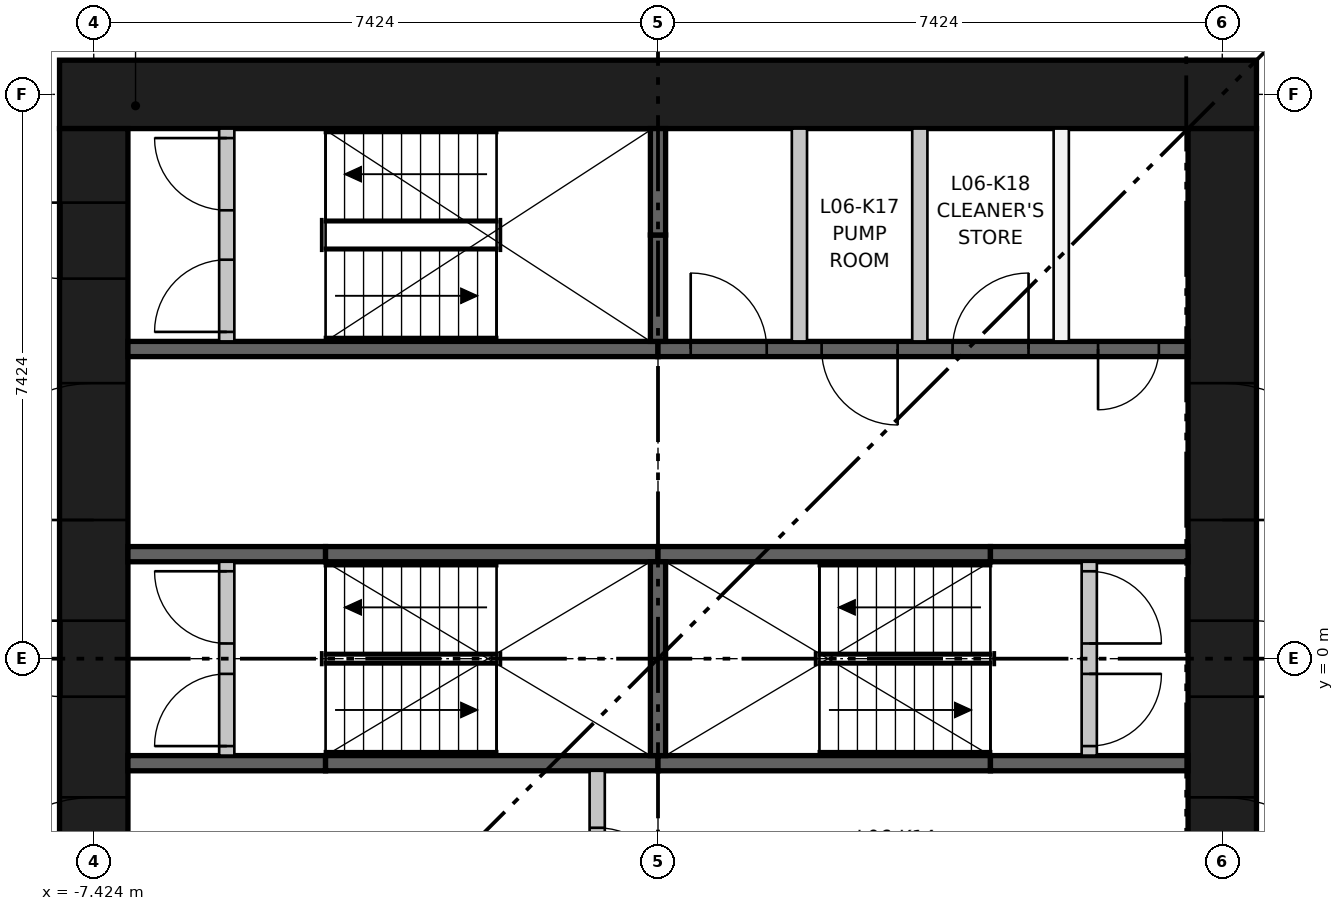
"""IFC4 building model, lengths in metres.
Left out: names, types, materials, properties, quantities, classifications, styles, units other than length and angle.
Written with IfcOpenShell. Run it as: python <this file> out.ifc"""

import sys

from ifc_helpers import new_model, si_unit, direction, frame, frame_2d, origin, place, context, subcontext, project, spatial, rectangle, extrude, element, fill, save


model = new_model("IFC4")
c1 = context("Model", 3, precision=1e-05, world=origin(), true_north=direction((0.0, 1.0)))
c2 = subcontext(c1, "Body", "Model", "MODEL_VIEW")
j1 = project(units=[si_unit("LENGTHUNIT", "METRE"), si_unit("PLANEANGLEUNIT", "RADIAN")], contexts=[c1])
p1 = place(None, origin())
s1 = spatial("IfcSite", under=j1, at=p1, CompositionType="ELEMENT")
p2 = place(p1, origin())
s2 = spatial("IfcBuilding", under=s1, at=p2, CompositionType="ELEMENT")
p3 = place(p2, frame((0.0, 0.0, 26.2)))
s3 = spatial("IfcBuildingStorey", under=s2, at=p3, CompositionType="ELEMENT", Elevation=26.2)
p4 = place(p3, frame((-7.874, 7.424, 0.0), z_axis=(0.0, 0.0, 1.0), x_axis=(1.0, 0.0, 0.0)))
e1 = element("IfcWall", 1, at=p4, inside=s3, PredefinedType="SHEAR", context=c2, shape_type="SweptSolid", body=[
    extrude(rectangle(XDim=15.748, YDim=0.9, at=frame_2d((7.874, 0.0))), origin(), (0.0, 0.0, 1.0), 3.65),
])
p5 = place(p3, frame((-7.424, -6.974, 0.0), z_axis=(0.0, 0.0, 1.0), x_axis=(0.0, 1.0, 0.0)))
e2 = element("IfcWall", 2, at=p5, inside=s3, PredefinedType="SHEAR", context=c2, shape_type="SweptSolid", body=[
    extrude(rectangle(XDim=13.948, YDim=0.9, at=frame_2d((6.974, 0.0))), origin(), (0.0, 0.0, 1.0), 3.65),
])
p6 = place(p5, frame((6.474, 0.0, 0.0)))
e3 = element("IfcOpeningElement", 3, at=p6, cuts=e2, PredefinedType="OPENING", context=c2, shape_type="SweptSolid", body=[
    extrude(rectangle(XDim=1.0, YDim=2.1, at=frame_2d((0.5, 1.05))), frame((0.0, 0.46, 0.0), z_axis=(0.0, -1.0, 0.0), x_axis=(1.0, 0.0, 0.0)), (0.0, 0.0, 1.0), 0.92),
])
p7 = place(p5, frame((3.35, 0.0, 0.0)))
e4 = element("IfcOpeningElement", 4, at=p7, cuts=e2, PredefinedType="OPENING", context=c2, shape_type="SweptSolid", body=[
    extrude(rectangle(XDim=1.8, YDim=2.1, at=frame_2d((0.9, 1.05))), frame((0.0, 0.46, 0.0), z_axis=(0.0, -1.0, 0.0), x_axis=(1.0, 0.0, 0.0)), (0.0, 0.0, 1.0), 0.92),
])
p8 = place(p5, frame((8.799, 0.0, 0.0)))
e5 = element("IfcOpeningElement", 5, at=p8, cuts=e2, PredefinedType="OPENING", context=c2, shape_type="SweptSolid", body=[
    extrude(rectangle(XDim=1.8, YDim=2.1, at=frame_2d((0.9, 1.05))), frame((0.0, 0.46, 0.0), z_axis=(0.0, -1.0, 0.0), x_axis=(1.0, 0.0, 0.0)), (0.0, 0.0, 1.0), 0.92),
])
p9 = place(p5, frame((11.974, 0.0, 0.0)))
e6 = element("IfcOpeningElement", 6, at=p9, cuts=e2, PredefinedType="OPENING", context=c2, shape_type="SweptSolid", body=[
    extrude(rectangle(XDim=1.0, YDim=2.1, at=frame_2d((0.5, 1.05))), frame((0.0, 0.46, 0.0), z_axis=(0.0, -1.0, 0.0), x_axis=(1.0, 0.0, 0.0)), (0.0, 0.0, 1.0), 0.92),
])
p10 = place(p3, frame((7.424, -6.974, 0.0), z_axis=(0.0, 0.0, 1.0), x_axis=(0.0, 1.0, 0.0)))
e7 = element("IfcWall", 7, at=p10, inside=s3, PredefinedType="SHEAR", context=c2, shape_type="SweptSolid", body=[
    extrude(rectangle(XDim=13.948, YDim=0.9, at=frame_2d((6.974, 0.0))), origin(), (0.0, 0.0, 1.0), 3.65),
])
p11 = place(p10, frame((6.474, 0.0, 0.0)))
e8 = element("IfcOpeningElement", 8, at=p11, cuts=e7, PredefinedType="OPENING", context=c2, shape_type="SweptSolid", body=[
    extrude(rectangle(XDim=1.0, YDim=2.1, at=frame_2d((0.5, 1.05))), frame((0.0, 0.46, 0.0), z_axis=(0.0, -1.0, 0.0), x_axis=(1.0, 0.0, 0.0)), (0.0, 0.0, 1.0), 0.92),
])
p12 = place(p10, frame((3.35, 0.0, 0.0)))
e9 = element("IfcOpeningElement", 9, at=p12, cuts=e7, PredefinedType="OPENING", context=c2, shape_type="SweptSolid", body=[
    extrude(rectangle(XDim=1.8, YDim=2.1, at=frame_2d((0.9, 1.05))), frame((0.0, 0.46, 0.0), z_axis=(0.0, -1.0, 0.0), x_axis=(1.0, 0.0, 0.0)), (0.0, 0.0, 1.0), 0.92),
])
p13 = place(p10, frame((8.799, 0.0, 0.0)))
e10 = element("IfcOpeningElement", 10, at=p13, cuts=e7, PredefinedType="OPENING", context=c2, shape_type="SweptSolid", body=[
    extrude(rectangle(XDim=1.8, YDim=2.1, at=frame_2d((0.9, 1.05))), frame((0.0, 0.46, 0.0), z_axis=(0.0, -1.0, 0.0), x_axis=(1.0, 0.0, 0.0)), (0.0, 0.0, 1.0), 0.92),
])
p14 = place(p3, frame((-6.974, 4.074, 0.0), z_axis=(0.0, 0.0, 1.0), x_axis=(1.0, 0.0, 0.0)))
e11 = element("IfcWall", 11, at=p14, inside=s3, PredefinedType="SHEAR", context=c2, shape_type="SweptSolid", body=[
    extrude(rectangle(XDim=6.974, YDim=0.2, at=frame_2d((3.487, 0.0))), origin(), (0.0, 0.0, 1.0), 3.3),
])
p15 = place(p3, frame((0.0, 4.074, 0.0), z_axis=(0.0, 0.0, 1.0), x_axis=(1.0, 0.0, 0.0)))
e12 = element("IfcWall", 12, at=p15, inside=s3, PredefinedType="SHEAR", context=c2, shape_type="SweptSolid", body=[
    extrude(rectangle(XDim=6.974, YDim=0.2, at=frame_2d((3.487, 0.0))), origin(), (0.0, 0.0, 1.0), 3.3),
])
p16 = place(p15, frame((0.43, 0.0, 0.0)))
e13 = element("IfcOpeningElement", 13, at=p16, cuts=e12, PredefinedType="OPENING", context=c2, shape_type="SweptSolid", body=[
    extrude(rectangle(XDim=1.0, YDim=2.1, at=frame_2d((0.5, 1.05))), frame((0.0, 0.11, 0.0), z_axis=(0.0, -1.0, 0.0), x_axis=(1.0, 0.0, 0.0)), (0.0, 0.0, 1.0), 0.22),
])
p17 = place(p15, frame((2.153, 0.0, 0.0)))
e14 = element("IfcOpeningElement", 14, at=p17, cuts=e12, PredefinedType="OPENING", context=c2, shape_type="SweptSolid", body=[
    extrude(rectangle(XDim=1.0, YDim=2.1, at=frame_2d((0.5, 1.05))), frame((0.0, 0.11, 0.0), z_axis=(0.0, -1.0, 0.0), x_axis=(1.0, 0.0, 0.0)), (0.0, 0.0, 1.0), 0.22),
])
p18 = place(p15, frame((3.875, 0.0, 0.0)))
e15 = element("IfcOpeningElement", 15, at=p18, cuts=e12, PredefinedType="OPENING", context=c2, shape_type="SweptSolid", body=[
    extrude(rectangle(XDim=1.0, YDim=2.1, at=frame_2d((0.5, 1.05))), frame((0.0, 0.11, 0.0), z_axis=(0.0, -1.0, 0.0), x_axis=(1.0, 0.0, 0.0)), (0.0, 0.0, 1.0), 0.22),
])
p19 = place(p15, frame((5.79, 0.0, 0.0)))
e16 = element("IfcOpeningElement", 16, at=p19, cuts=e12, PredefinedType="OPENING", context=c2, shape_type="SweptSolid", body=[
    extrude(rectangle(XDim=0.8, YDim=2.1, at=frame_2d((0.4, 1.05))), frame((0.0, 0.11, 0.0), z_axis=(0.0, -1.0, 0.0), x_axis=(1.0, 0.0, 0.0)), (0.0, 0.0, 1.0), 0.22),
])
p20 = place(p3, frame((-6.974, -1.375, 0.0), z_axis=(0.0, 0.0, 1.0), x_axis=(1.0, 0.0, 0.0)))
e17 = element("IfcWall", 17, at=p20, inside=s3, PredefinedType="SHEAR", context=c2, shape_type="SweptSolid", body=[
    extrude(rectangle(XDim=2.6, YDim=0.2, at=frame_2d((1.3, 0.0))), origin(), (0.0, 0.0, 1.0), 3.3),
])
for number, where, z_axis, x_axis in (
    (18, (-4.374, -1.375, 0.0), (0.0, 0.0, 1.0), (1.0, 0.0, 0.0)),
    (19, (0.0, -1.375, 0.0), (0.0, 0.0, 1.0), (1.0, 0.0, 0.0)),
):
    element("IfcWall", number, at=place(p3, frame(where, z_axis=z_axis, x_axis=x_axis)), inside=s3, PredefinedType="SHEAR", context=c2, shape_type="SweptSolid", body=[
        extrude(rectangle(XDim=4.374, YDim=0.2, at=frame_2d((2.187, 0.0))), origin(), (0.0, 0.0, 1.0), 3.3),
    ])
for number, where, z_axis, x_axis in (
    (20, (4.374, -1.375, 0.0), (0.0, 0.0, 1.0), (1.0, 0.0, 0.0)),
    (21, (-6.974, 1.375, 0.0), (0.0, 0.0, 1.0), (1.0, 0.0, 0.0)),
):
    element("IfcWall", number, at=place(p3, frame(where, z_axis=z_axis, x_axis=x_axis)), inside=s3, PredefinedType="SHEAR", context=c2, shape_type="SweptSolid", body=[
        extrude(rectangle(XDim=2.6, YDim=0.2, at=frame_2d((1.3, 0.0))), origin(), (0.0, 0.0, 1.0), 3.3),
    ])
for number, where, z_axis, x_axis in (
    (22, (-4.374, 1.375, 0.0), (0.0, 0.0, 1.0), (1.0, 0.0, 0.0)),
    (23, (0.0, 1.375, 0.0), (0.0, 0.0, 1.0), (1.0, 0.0, 0.0)),
):
    element("IfcWall", number, at=place(p3, frame(where, z_axis=z_axis, x_axis=x_axis)), inside=s3, PredefinedType="SHEAR", context=c2, shape_type="SweptSolid", body=[
        extrude(rectangle(XDim=4.374, YDim=0.2, at=frame_2d((2.187, 0.0))), origin(), (0.0, 0.0, 1.0), 3.3),
    ])
p21 = place(p3, frame((4.374, 1.375, 0.0), z_axis=(0.0, 0.0, 1.0), x_axis=(1.0, 0.0, 0.0)))
e24 = element("IfcWall", 24, at=p21, inside=s3, PredefinedType="SHEAR", context=c2, shape_type="SweptSolid", body=[
    extrude(rectangle(XDim=2.6, YDim=0.2, at=frame_2d((1.3, 0.0))), origin(), (0.0, 0.0, 1.0), 3.3),
])
p22 = place(p3, frame((0.0, -1.275, 0.0), z_axis=(0.0, 0.0, 1.0), x_axis=(0.0, 1.0, 0.0)))
e25 = element("IfcWall", 25, at=p22, inside=s3, PredefinedType="SHEAR", context=c2, shape_type="SweptSolid", body=[
    extrude(rectangle(XDim=2.55, YDim=0.2, at=frame_2d((1.275, 0.0))), origin(), (0.0, 0.0, 1.0), 3.3),
])
p23 = place(p3, frame((-0.8, -3.974, 0.0), z_axis=(0.0, 0.0, 1.0), x_axis=(0.0, 1.0, 0.0)))
e26 = element("IfcWall", 26, at=p23, inside=s3, PredefinedType="PARTITIONING", context=c2, shape_type="SweptSolid", body=[
    extrude(rectangle(XDim=2.499, YDim=0.2, at=frame_2d((1.25, 0.0))), origin(), (0.0, 0.0, 1.0), 3.3),
])
p24 = place(p23, frame((0.75, 0.0, 0.0)))
e27 = element("IfcOpeningElement", 27, at=p24, cuts=e26, PredefinedType="OPENING", context=c2, shape_type="SweptSolid", body=[
    extrude(rectangle(XDim=1.0, YDim=2.1, at=frame_2d((0.5, 1.05))), frame((0.0, 0.11, 0.0), z_axis=(0.0, -1.0, 0.0), x_axis=(1.0, 0.0, 0.0)), (0.0, 0.0, 1.0), 0.22),
])
p25 = place(p3, frame((0.0, 4.174, 0.0), z_axis=(0.0, 0.0, 1.0), x_axis=(0.0, 1.0, 0.0)))
e28 = element("IfcWall", 28, at=p25, inside=s3, PredefinedType="SHEAR", context=c2, shape_type="SweptSolid", body=[
    extrude(rectangle(XDim=1.4, YDim=0.2, at=frame_2d((0.7, 0.0))), origin(), (0.0, 0.0, 1.0), 3.3),
])
p26 = place(p3, frame((0.0, 5.574, 0.0), z_axis=(0.0, 0.0, 1.0), x_axis=(0.0, 1.0, 0.0)))
e29 = element("IfcWall", 29, at=p26, inside=s3, PredefinedType="SHEAR", context=c2, shape_type="SweptSolid", body=[
    extrude(rectangle(XDim=1.4, YDim=0.2, at=frame_2d((0.7, 0.0))), origin(), (0.0, 0.0, 1.0), 3.3),
])
for number, where, z_axis, x_axis in (
    (30, (1.861, 4.174, 0.0), (0.0, 0.0, 1.0), (0.0, 1.0, 0.0)),
    (31, (3.445, 4.174, 0.0), (0.0, 0.0, 1.0), (0.0, 1.0, 0.0)),
    (32, (5.305, 4.174, 0.0), (0.0, 0.0, 1.0), (0.0, 1.0, 0.0)),
):
    element("IfcWall", number, at=place(p3, frame(where, z_axis=z_axis, x_axis=x_axis)), inside=s3, PredefinedType="PARTITIONING", context=c2, shape_type="SweptSolid", body=[
        extrude(rectangle(XDim=2.8, YDim=0.2, at=frame_2d((1.4, 0.0))), origin(), (0.0, 0.0, 1.0), 3.3),
    ])
p27 = place(p3, frame((-5.674, -1.275, 0.0), z_axis=(0.0, 0.0, 1.0), x_axis=(0.0, 1.0, 0.0)))
e33 = element("IfcWall", 33, at=p27, inside=s3, PredefinedType="PARTITIONING", context=c2, shape_type="SweptSolid", body=[
    extrude(rectangle(XDim=2.55, YDim=0.2, at=frame_2d((1.275, 0.0))), origin(), (0.0, 0.0, 1.0), 3.3),
])
p28 = place(p27, frame((0.125, 0.0, 0.0)))
e34 = element("IfcOpeningElement", 34, at=p28, cuts=e33, PredefinedType="OPENING", context=c2, shape_type="SweptSolid", body=[
    extrude(rectangle(XDim=0.95, YDim=2.1, at=frame_2d((0.475, 1.05))), frame((0.0, 0.11, 0.0), z_axis=(0.0, -1.0, 0.0), x_axis=(1.0, 0.0, 0.0)), (0.0, 0.0, 1.0), 0.22),
])
p29 = place(p27, frame((1.475, 0.0, 0.0)))
e35 = element("IfcOpeningElement", 35, at=p29, cuts=e33, PredefinedType="OPENING", context=c2, shape_type="SweptSolid", body=[
    extrude(rectangle(XDim=0.95, YDim=2.1, at=frame_2d((0.475, 1.05))), frame((0.0, 0.11, 0.0), z_axis=(0.0, -1.0, 0.0), x_axis=(1.0, 0.0, 0.0)), (0.0, 0.0, 1.0), 0.22),
])
p30 = place(p3, frame((5.674, -1.275, 0.0), z_axis=(0.0, 0.0, 1.0), x_axis=(0.0, 1.0, 0.0)))
e36 = element("IfcWall", 36, at=p30, inside=s3, PredefinedType="PARTITIONING", context=c2, shape_type="SweptSolid", body=[
    extrude(rectangle(XDim=2.55, YDim=0.2, at=frame_2d((1.275, 0.0))), origin(), (0.0, 0.0, 1.0), 3.3),
])
p31 = place(p30, frame((0.125, 0.0, 0.0)))
e37 = element("IfcOpeningElement", 37, at=p31, cuts=e36, PredefinedType="OPENING", context=c2, shape_type="SweptSolid", body=[
    extrude(rectangle(XDim=0.95, YDim=2.1, at=frame_2d((0.475, 1.05))), frame((0.0, 0.11, 0.0), z_axis=(0.0, -1.0, 0.0), x_axis=(1.0, 0.0, 0.0)), (0.0, 0.0, 1.0), 0.22),
])
p32 = place(p30, frame((1.475, 0.0, 0.0)))
e38 = element("IfcOpeningElement", 38, at=p32, cuts=e36, PredefinedType="OPENING", context=c2, shape_type="SweptSolid", body=[
    extrude(rectangle(XDim=0.95, YDim=2.1, at=frame_2d((0.475, 1.05))), frame((0.0, 0.11, 0.0), z_axis=(0.0, -1.0, 0.0), x_axis=(1.0, 0.0, 0.0)), (0.0, 0.0, 1.0), 0.22),
])
p33 = place(p3, frame((-5.674, 4.174, 0.0), z_axis=(0.0, 0.0, 1.0), x_axis=(0.0, 1.0, 0.0)))
e39 = element("IfcWall", 39, at=p33, inside=s3, PredefinedType="PARTITIONING", context=c2, shape_type="SweptSolid", body=[
    extrude(rectangle(XDim=2.8, YDim=0.2, at=frame_2d((1.4, 0.0))), origin(), (0.0, 0.0, 1.0), 3.3),
])
p34 = place(p33, frame((0.125, 0.0, 0.0)))
e40 = element("IfcOpeningElement", 40, at=p34, cuts=e39, PredefinedType="OPENING", context=c2, shape_type="SweptSolid", body=[
    extrude(rectangle(XDim=0.95, YDim=2.1, at=frame_2d((0.475, 1.05))), frame((0.0, 0.11, 0.0), z_axis=(0.0, -1.0, 0.0), x_axis=(1.0, 0.0, 0.0)), (0.0, 0.0, 1.0), 0.22),
])
p35 = place(p33, frame((1.725, 0.0, 0.0)))
e41 = element("IfcOpeningElement", 41, at=p35, cuts=e39, PredefinedType="OPENING", context=c2, shape_type="SweptSolid", body=[
    extrude(rectangle(XDim=0.95, YDim=2.1, at=frame_2d((0.475, 1.05))), frame((0.0, 0.11, 0.0), z_axis=(0.0, -1.0, 0.0), x_axis=(1.0, 0.0, 0.0)), (0.0, 0.0, 1.0), 0.22),
])
p36 = place(p28, origin())
e42 = element("IfcDoor", 42, at=p36, inside=s3, OperationType="SINGLE_SWING_LEFT", PredefinedType="DOOR", context=c2, shape_type="SweptSolid", body=[
    extrude(rectangle(XDim=0.95, YDim=2.1, at=frame_2d((0.475, 1.05))), frame((0.0, 0.025, 0.0), z_axis=(0.0, -1.0, 0.0), x_axis=(1.0, 0.0, 0.0)), (0.0, 0.0, 1.0), 0.05),
])
fill(e34, e42)
p37 = place(p29, origin())
e43 = element("IfcDoor", 43, at=p37, inside=s3, OperationType="SINGLE_SWING_RIGHT", PredefinedType="DOOR", context=c2, shape_type="SweptSolid", body=[
    extrude(rectangle(XDim=0.95, YDim=2.1, at=frame_2d((0.475, 1.05))), frame((0.0, 0.025, 0.0), z_axis=(0.0, -1.0, 0.0), x_axis=(1.0, 0.0, 0.0)), (0.0, 0.0, 1.0), 0.05),
])
fill(e35, e43)
p38 = place(p31, frame((0.95, 0.0, 0.0), z_axis=(0.0, 0.0, 1.0), x_axis=(-1.0, 0.0, 0.0)))
e44 = element("IfcDoor", 44, at=p38, inside=s3, OperationType="SINGLE_SWING_RIGHT", PredefinedType="DOOR", context=c2, shape_type="SweptSolid", body=[
    extrude(rectangle(XDim=0.95, YDim=2.1, at=frame_2d((0.475, 1.05))), frame((0.0, 0.025, 0.0), z_axis=(0.0, -1.0, 0.0), x_axis=(1.0, 0.0, 0.0)), (0.0, 0.0, 1.0), 0.05),
])
fill(e37, e44)
p39 = place(p32, frame((0.95, 0.0, 0.0), z_axis=(0.0, 0.0, 1.0), x_axis=(-1.0, 0.0, 0.0)))
e45 = element("IfcDoor", 45, at=p39, inside=s3, OperationType="SINGLE_SWING_LEFT", PredefinedType="DOOR", context=c2, shape_type="SweptSolid", body=[
    extrude(rectangle(XDim=0.95, YDim=2.1, at=frame_2d((0.475, 1.05))), frame((0.0, 0.025, 0.0), z_axis=(0.0, -1.0, 0.0), x_axis=(1.0, 0.0, 0.0)), (0.0, 0.0, 1.0), 0.05),
])
fill(e38, e45)
p40 = place(p34, origin())
e46 = element("IfcDoor", 46, at=p40, inside=s3, OperationType="SINGLE_SWING_LEFT", PredefinedType="DOOR", context=c2, shape_type="SweptSolid", body=[
    extrude(rectangle(XDim=0.95, YDim=2.1, at=frame_2d((0.475, 1.05))), frame((0.0, 0.025, 0.0), z_axis=(0.0, -1.0, 0.0), x_axis=(1.0, 0.0, 0.0)), (0.0, 0.0, 1.0), 0.05),
])
fill(e40, e46)
p41 = place(p35, origin())
e47 = element("IfcDoor", 47, at=p41, inside=s3, OperationType="SINGLE_SWING_RIGHT", PredefinedType="DOOR", context=c2, shape_type="SweptSolid", body=[
    extrude(rectangle(XDim=0.95, YDim=2.1, at=frame_2d((0.475, 1.05))), frame((0.0, 0.025, 0.0), z_axis=(0.0, -1.0, 0.0), x_axis=(1.0, 0.0, 0.0)), (0.0, 0.0, 1.0), 0.05),
])
fill(e41, e47)
p42 = place(p24, frame((1.0, 0.0, 0.0), z_axis=(0.0, 0.0, 1.0), x_axis=(-1.0, 0.0, 0.0)))
e48 = element("IfcDoor", 48, at=p42, inside=s3, OperationType="SINGLE_SWING_LEFT", PredefinedType="DOOR", context=c2, shape_type="SweptSolid", body=[
    extrude(rectangle(XDim=1.0, YDim=2.1, at=frame_2d((0.5, 1.05))), frame((0.0, 0.025, 0.0), z_axis=(0.0, -1.0, 0.0), x_axis=(1.0, 0.0, 0.0)), (0.0, 0.0, 1.0), 0.05),
])
fill(e27, e48)
p43 = place(p16, origin())
e49 = element("IfcDoor", 49, at=p43, inside=s3, OperationType="SINGLE_SWING_LEFT", PredefinedType="DOOR", context=c2, shape_type="SweptSolid", body=[
    extrude(rectangle(XDim=1.0, YDim=2.1, at=frame_2d((0.5, 1.05))), frame((0.0, 0.025, 0.0), z_axis=(0.0, -1.0, 0.0), x_axis=(1.0, 0.0, 0.0)), (0.0, 0.0, 1.0), 0.05),
])
fill(e13, e49)
p44 = place(p17, frame((1.0, 0.0, 0.0), z_axis=(0.0, 0.0, 1.0), x_axis=(-1.0, 0.0, 0.0)))
e50 = element("IfcDoor", 50, at=p44, inside=s3, OperationType="SINGLE_SWING_RIGHT", PredefinedType="DOOR", context=c2, shape_type="SweptSolid", body=[
    extrude(rectangle(XDim=1.0, YDim=2.1, at=frame_2d((0.5, 1.05))), frame((0.0, 0.025, 0.0), z_axis=(0.0, -1.0, 0.0), x_axis=(1.0, 0.0, 0.0)), (0.0, 0.0, 1.0), 0.05),
])
fill(e14, e50)
p45 = place(p18, origin())
e51 = element("IfcDoor", 51, at=p45, inside=s3, OperationType="SINGLE_SWING_RIGHT", PredefinedType="DOOR", context=c2, shape_type="SweptSolid", body=[
    extrude(rectangle(XDim=1.0, YDim=2.1, at=frame_2d((0.5, 1.05))), frame((0.0, 0.025, 0.0), z_axis=(0.0, -1.0, 0.0), x_axis=(1.0, 0.0, 0.0)), (0.0, 0.0, 1.0), 0.05),
])
fill(e15, e51)
p46 = place(p19, frame((0.8, 0.0, 0.0), z_axis=(0.0, 0.0, 1.0), x_axis=(-1.0, 0.0, 0.0)))
e52 = element("IfcDoor", 52, at=p46, inside=s3, OperationType="SINGLE_SWING_LEFT", PredefinedType="DOOR", context=c2, shape_type="SweptSolid", body=[
    extrude(rectangle(XDim=0.8, YDim=2.1, at=frame_2d((0.4, 1.05))), frame((0.0, 0.025, 0.0), z_axis=(0.0, -1.0, 0.0), x_axis=(1.0, 0.0, 0.0)), (0.0, 0.0, 1.0), 0.05),
])
fill(e16, e52)
p47 = place(p6, origin())
e53 = element("IfcDoor", 53, at=p47, inside=s3, OperationType="SINGLE_SWING_RIGHT", PredefinedType="DOOR", context=c2, shape_type="SweptSolid", body=[
    extrude(rectangle(XDim=1.0, YDim=2.1, at=frame_2d((0.5, 1.05))), frame((0.0, 0.45, 0.0), z_axis=(0.0, -1.0, 0.0), x_axis=(1.0, 0.0, 0.0)), (0.0, 0.0, 1.0), 0.05),
])
fill(e3, e53)
p48 = place(p7, origin())
e54 = element("IfcDoor", 54, at=p48, inside=s3, OperationType="DOUBLE_DOOR_SINGLE_SWING", PredefinedType="DOOR", context=c2, shape_type="SweptSolid", body=[
    extrude(rectangle(XDim=1.8, YDim=2.1, at=frame_2d((0.9, 1.05))), frame((0.0, 0.025, 0.0), z_axis=(0.0, -1.0, 0.0), x_axis=(1.0, 0.0, 0.0)), (0.0, 0.0, 1.0), 0.05),
])
fill(e4, e54)
p49 = place(p8, origin())
e55 = element("IfcDoor", 55, at=p49, inside=s3, OperationType="DOUBLE_DOOR_SINGLE_SWING", PredefinedType="DOOR", context=c2, shape_type="SweptSolid", body=[
    extrude(rectangle(XDim=1.8, YDim=2.1, at=frame_2d((0.9, 1.05))), frame((0.0, 0.025, 0.0), z_axis=(0.0, -1.0, 0.0), x_axis=(1.0, 0.0, 0.0)), (0.0, 0.0, 1.0), 0.05),
])
fill(e5, e55)
p50 = place(p9, origin())
e56 = element("IfcDoor", 56, at=p50, inside=s3, OperationType="SINGLE_SWING_RIGHT", PredefinedType="DOOR", context=c2, shape_type="SweptSolid", body=[
    extrude(rectangle(XDim=1.0, YDim=2.1, at=frame_2d((0.5, 1.05))), frame((0.0, 0.45, 0.0), z_axis=(0.0, -1.0, 0.0), x_axis=(1.0, 0.0, 0.0)), (0.0, 0.0, 1.0), 0.05),
])
fill(e6, e56)
p51 = place(p11, frame((1.0, 0.0, 0.0), z_axis=(0.0, 0.0, 1.0), x_axis=(-1.0, 0.0, 0.0)))
e57 = element("IfcDoor", 57, at=p51, inside=s3, OperationType="SINGLE_SWING_LEFT", PredefinedType="DOOR", context=c2, shape_type="SweptSolid", body=[
    extrude(rectangle(XDim=1.0, YDim=2.1, at=frame_2d((0.5, 1.05))), frame((0.0, 0.45, 0.0), z_axis=(0.0, -1.0, 0.0), x_axis=(1.0, 0.0, 0.0)), (0.0, 0.0, 1.0), 0.05),
])
fill(e8, e57)
p52 = place(p12, frame((1.8, 0.0, 0.0), z_axis=(0.0, 0.0, 1.0), x_axis=(-1.0, 0.0, 0.0)))
e58 = element("IfcDoor", 58, at=p52, inside=s3, OperationType="DOUBLE_DOOR_SINGLE_SWING", PredefinedType="DOOR", context=c2, shape_type="SweptSolid", body=[
    extrude(rectangle(XDim=1.8, YDim=2.1, at=frame_2d((0.9, 1.05))), frame((0.0, 0.025, 0.0), z_axis=(0.0, -1.0, 0.0), x_axis=(1.0, 0.0, 0.0)), (0.0, 0.0, 1.0), 0.05),
])
fill(e9, e58)
p53 = place(p13, frame((1.8, 0.0, 0.0), z_axis=(0.0, 0.0, 1.0), x_axis=(-1.0, 0.0, 0.0)))
e59 = element("IfcDoor", 59, at=p53, inside=s3, OperationType="DOUBLE_DOOR_SINGLE_SWING", PredefinedType="DOOR", context=c2, shape_type="SweptSolid", body=[
    extrude(rectangle(XDim=1.8, YDim=2.1, at=frame_2d((0.9, 1.05))), frame((0.0, 0.025, 0.0), z_axis=(0.0, -1.0, 0.0), x_axis=(1.0, 0.0, 0.0)), (0.0, 0.0, 1.0), 0.05),
])
fill(e10, e59)
save(model, sys.argv[1])
